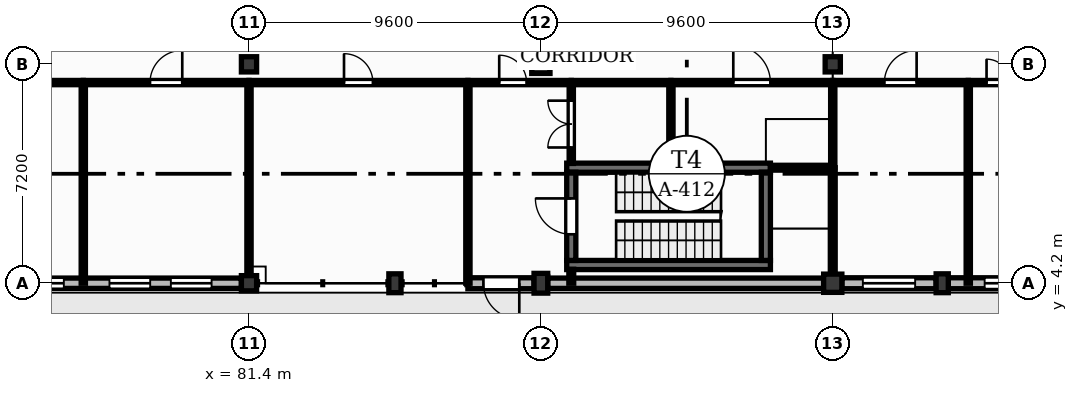
"""IFC4 building model, lengths in metres.
Left out: names, types, materials, properties, quantities, classifications, styles, units other than length and angle.
Written with IfcOpenShell. Run it as: python <this file> out.ifc"""

import sys

from ifc_helpers import new_model, si_unit, direction, frame, frame_2d, origin, origin_2d, place, context, subcontext, project, spatial, rectangle, extrude, element, fill, save


model = new_model("IFC4")
c1 = context("Model", 3, precision=1e-05, world=origin(), true_north=direction((0.0, 1.0)))
c2 = subcontext(c1, "Body", "Model", "MODEL_VIEW")
j1 = project(units=[si_unit("LENGTHUNIT", "METRE"), si_unit("PLANEANGLEUNIT", "RADIAN")], contexts=[c1])
p1 = place(None, origin())
s1 = spatial("IfcSite", under=j1, at=p1, CompositionType="ELEMENT")
p2 = place(p1, origin())
s2 = spatial("IfcBuilding", under=s1, at=p2, CompositionType="ELEMENT")
p3 = place(p2, origin())
s3 = spatial("IfcBuildingStorey", under=s2, at=p3, CompositionType="ELEMENT", Elevation=0.0)
for number, where, z_axis, x_axis in (
    (1, (81.4, 4.2, 0.0), (0.0, 0.0, 1.0), (1.0, 0.0, 0.0)),
    (2, (81.4, 11.4, 0.0), (0.0, 0.0, 1.0), (1.0, 0.0, 0.0)),
):
    element("IfcColumn", number, at=place(p3, frame(where, z_axis=z_axis, x_axis=x_axis)), inside=s3, PredefinedType="COLUMN", context=c2, shape_type="SweptSolid", body=[
        extrude(rectangle(XDim=0.5, YDim=0.5, at=origin_2d()), origin(), (0.0, 0.0, 1.0), 4.2),
    ])
p4 = place(p3, frame((91.0, 4.2, 0.0), z_axis=(0.0, 0.0, 1.0), x_axis=(1.0, 0.0, 0.0)))
e3 = element("IfcColumn", 3, at=p4, inside=s3, PredefinedType="COLUMN", context=c2, shape_type="SweptSolid", body=[
    extrude(rectangle(XDim=0.45, YDim=0.65, at=origin_2d()), origin(), (0.0, 0.0, 1.0), 4.2),
])
for number, where, z_axis, x_axis in (
    (4, (91.0, 11.4, 0.0), (0.0, 0.0, 1.0), (1.0, 0.0, 0.0)),
    (5, (100.6, 4.2, 0.0), (0.0, 0.0, 1.0), (1.0, 0.0, 0.0)),
):
    element("IfcColumn", number, at=place(p3, frame(where, z_axis=z_axis, x_axis=x_axis)), inside=s3, PredefinedType="COLUMN", context=c2, shape_type="SweptSolid", body=[
        extrude(rectangle(XDim=0.6, YDim=0.6, at=origin_2d()), origin(), (0.0, 0.0, 1.0), 4.2),
    ])
p5 = place(p3, frame((100.6, 11.4, 0.0), z_axis=(0.0, 0.0, 1.0), x_axis=(1.0, 0.0, 0.0)))
e6 = element("IfcColumn", 6, at=p5, inside=s3, PredefinedType="COLUMN", context=c2, shape_type="SweptSolid", body=[
    extrude(rectangle(XDim=0.5, YDim=0.5, at=origin_2d()), origin(), (0.0, 0.0, 1.0), 4.2),
])
for number, where, z_axis, x_axis in (
    (7, (86.2, 4.2, 0.0), (0.0, 0.0, 1.0), (1.0, 0.0, 0.0)),
    (8, (104.2, 4.2, 0.0), (0.0, 0.0, 1.0), (1.0, 0.0, 0.0)),
):
    element("IfcColumn", number, at=place(p3, frame(where, z_axis=z_axis, x_axis=x_axis)), inside=s3, PredefinedType="PILASTER", context=c2, shape_type="SweptSolid", body=[
        extrude(rectangle(XDim=0.4, YDim=0.62, at=origin_2d()), origin(), (0.0, 0.0, 1.0), 4.2),
    ])
p6 = place(p3, frame((72.9, 4.2, 0.0), z_axis=(0.0, 0.0, 1.0), x_axis=(1.0, 0.0, 0.0)))
e9 = element("IfcWall", 9, at=p6, inside=s3, PredefinedType="SOLIDWALL", context=c2, shape_type="SweptSolid", body=[
    extrude(rectangle(XDim=8.25, YDim=0.34, at=frame_2d((4.125, 0.0))), origin(), (0.0, 0.0, 1.0), 3.68),
])
p7 = place(p6, frame((0.76, 0.0, 1.35)))
e10 = element("IfcOpeningElement", 10, at=p7, cuts=e9, PredefinedType="OPENING", context=c2, shape_type="SweptSolid", body=[
    extrude(rectangle(XDim=1.65, YDim=1.4, at=frame_2d((0.825, 0.7))), frame((0.0, 0.18, 0.0), z_axis=(0.0, -1.0, 0.0), x_axis=(1.0, 0.0, 0.0)), (0.0, 0.0, 1.0), 0.36),
])
p8 = place(p6, frame((3.91, 0.0, 1.0)))
e11 = element("IfcOpeningElement", 11, at=p8, cuts=e9, PredefinedType="OPENING", context=c2, shape_type="SweptSolid", body=[
    extrude(rectangle(XDim=1.34, YDim=1.95, at=frame_2d((0.67, 0.975))), frame((0.0, 0.18, 0.0), z_axis=(0.0, -1.0, 0.0), x_axis=(1.0, 0.0, 0.0)), (0.0, 0.0, 1.0), 0.36),
])
p9 = place(p6, frame((5.93, 0.0, 1.0)))
e12 = element("IfcOpeningElement", 12, at=p9, cuts=e9, PredefinedType="OPENING", context=c2, shape_type="SweptSolid", body=[
    extrude(rectangle(XDim=1.34, YDim=1.95, at=frame_2d((0.67, 0.975))), frame((0.0, 0.18, 0.0), z_axis=(0.0, -1.0, 0.0), x_axis=(1.0, 0.0, 0.0)), (0.0, 0.0, 1.0), 0.36),
])
p10 = place(p3, frame((88.6, 4.2, 0.0), z_axis=(0.0, 0.0, 1.0), x_axis=(1.0, 0.0, 0.0)))
e13 = element("IfcWall", 13, at=p10, inside=s3, PredefinedType="SOLIDWALL", context=c2, shape_type="SweptSolid", body=[
    extrude(rectangle(XDim=2.175, YDim=0.36, at=frame_2d((1.087, 0.0))), origin(), (0.0, 0.0, 1.0), 3.68),
])
p11 = place(p10, frame((0.51, 0.0, 0.0)))
e14 = element("IfcOpeningElement", 14, at=p11, cuts=e13, PredefinedType="OPENING", context=c2, shape_type="SweptSolid", body=[
    extrude(rectangle(XDim=1.18, YDim=2.2, at=frame_2d((0.59, 1.1))), frame((0.0, 0.19, 0.0), z_axis=(0.0, -1.0, 0.0), x_axis=(1.0, 0.0, 0.0)), (0.0, 0.0, 1.0), 0.38),
])
p12 = place(p3, frame((91.225, 4.2, 0.0), z_axis=(0.0, 0.0, 1.0), x_axis=(1.0, 0.0, 0.0)))
e15 = element("IfcWall", 15, at=p12, inside=s3, PredefinedType="SOLIDWALL", context=c2, shape_type="SweptSolid", body=[
    extrude(rectangle(XDim=9.075, YDim=0.34, at=frame_2d((4.538, 0.0))), origin(), (0.0, 0.0, 1.0), 3.68),
])
p13 = place(p3, frame((100.9, 4.2, 0.0), z_axis=(0.0, 0.0, 1.0), x_axis=(1.0, 0.0, 0.0)))
e16 = element("IfcWall", 16, at=p13, inside=s3, PredefinedType="SOLIDWALL", context=c2, shape_type="SweptSolid", body=[
    extrude(rectangle(XDim=3.1, YDim=0.36, at=frame_2d((1.55, 0.0))), origin(), (0.0, 0.0, 1.0), 3.68),
])
p14 = place(p13, frame((0.69, 0.0, 1.0)))
e17 = element("IfcOpeningElement", 17, at=p14, cuts=e16, PredefinedType="OPENING", context=c2, shape_type="SweptSolid", body=[
    extrude(rectangle(XDim=1.72, YDim=2.2, at=frame_2d((0.86, 1.1))), frame((0.0, 0.19, 0.0), z_axis=(0.0, -1.0, 0.0), x_axis=(1.0, 0.0, 0.0)), (0.0, 0.0, 1.0), 0.38),
])
p15 = place(p3, frame((104.4, 4.2, 0.0), z_axis=(0.0, 0.0, 1.0), x_axis=(1.0, 0.0, 0.0)))
e18 = element("IfcWall", 18, at=p15, inside=s3, PredefinedType="SOLIDWALL", context=c2, shape_type="SweptSolid", body=[
    extrude(rectangle(XDim=3.175, YDim=0.36, at=frame_2d((1.587, 0.0))), origin(), (0.0, 0.0, 1.0), 3.68),
])
p16 = place(p15, frame((1.196, 0.0, 1.5)))
e19 = element("IfcOpeningElement", 19, at=p16, cuts=e18, PredefinedType="OPENING", context=c2, shape_type="SweptSolid", body=[
    extrude(rectangle(XDim=1.32, YDim=1.25, at=frame_2d((0.66, 0.625))), frame((0.0, 0.19, 0.0), z_axis=(0.0, -1.0, 0.0), x_axis=(1.0, 0.0, 0.0)), (0.0, 0.0, 1.0), 0.38),
])
for number, where, z_axis, x_axis in (
    (20, (91.85, 4.8, 0.0), (0.0, 0.0, 1.0), (1.0, 0.0, 0.0)),
    (21, (91.85, 8.0, 0.0), (0.0, 0.0, 1.0), (1.0, 0.0, 0.0)),
):
    element("IfcWall", number, at=place(p3, frame(where, z_axis=z_axis, x_axis=x_axis)), inside=s3, PredefinedType="SHEAR", context=c2, shape_type="SweptSolid", body=[
        extrude(rectangle(XDim=6.7, YDim=0.3, at=frame_2d((3.35, 0.0))), origin(), (0.0, 0.0, 1.0), 4.25),
    ])
p17 = place(p3, frame((92.0, 4.95, 0.0), z_axis=(0.0, 0.0, 1.0), x_axis=(0.0, 1.0, 0.0)))
e22 = element("IfcWall", 22, at=p17, inside=s3, PredefinedType="SHEAR", context=c2, shape_type="SweptSolid", body=[
    extrude(rectangle(XDim=2.9, YDim=0.3, at=frame_2d((1.45, 0.0))), origin(), (0.0, 0.0, 1.0), 4.25),
])
p18 = place(p17, frame((0.86, 0.0, 0.0)))
e23 = element("IfcOpeningElement", 23, at=p18, cuts=e22, PredefinedType="OPENING", context=c2, shape_type="SweptSolid", body=[
    extrude(rectangle(XDim=1.18, YDim=2.15, at=frame_2d((0.59, 1.075))), frame((0.0, 0.16, 0.0), z_axis=(0.0, -1.0, 0.0), x_axis=(1.0, 0.0, 0.0)), (0.0, 0.0, 1.0), 0.32),
])
p19 = place(p3, frame((98.4, 4.95, 0.0), z_axis=(0.0, 0.0, 1.0), x_axis=(0.0, 1.0, 0.0)))
e24 = element("IfcWall", 24, at=p19, inside=s3, PredefinedType="SHEAR", context=c2, shape_type="SweptSolid", body=[
    extrude(rectangle(XDim=2.9, YDim=0.3, at=frame_2d((1.45, 0.0))), origin(), (0.0, 0.0, 1.0), 4.25),
])
p20 = place(p3, frame((71.805, 10.8, 0.0), z_axis=(0.0, 0.0, 1.0), x_axis=(1.0, 0.0, 0.0)))
e25 = element("IfcWall", 25, at=p20, inside=s3, PredefinedType="PARTITIONING", context=c2, shape_type="SweptSolid", body=[
    extrude(rectangle(XDim=4.145, YDim=0.14, at=frame_2d((2.073, 0.0))), origin(), (0.0, 0.0, 1.0), 4.18),
])
p21 = place(p20, frame((1.583, 0.0, 0.0)))
e26 = element("IfcOpeningElement", 26, at=p21, cuts=e25, PredefinedType="OPENING", context=c2, shape_type="SweptSolid", body=[
    extrude(rectangle(XDim=0.98, YDim=2.15, at=frame_2d((0.49, 1.075))), frame((0.0, 0.08, 0.0), z_axis=(0.0, -1.0, 0.0), x_axis=(1.0, 0.0, 0.0)), (0.0, 0.0, 1.0), 0.16),
])
p22 = place(p3, frame((75.95, 4.2, 0.0), z_axis=(0.0, 0.0, 1.0), x_axis=(0.0, 1.0, 0.0)))
e27 = element("IfcWall", 27, at=p22, inside=s3, PredefinedType="PARTITIONING", context=c2, shape_type="SweptSolid", body=[
    extrude(rectangle(XDim=6.53, YDim=0.14, at=frame_2d((3.265, 0.0))), origin(), (0.0, 0.0, 1.0), 4.18),
])
p23 = place(p3, frame((75.95, 10.8, 0.0), z_axis=(0.0, 0.0, 1.0), x_axis=(1.0, 0.0, 0.0)))
e28 = element("IfcWall", 28, at=p23, inside=s3, PredefinedType="PARTITIONING", context=c2, shape_type="SweptSolid", body=[
    extrude(rectangle(XDim=5.45, YDim=0.14, at=frame_2d((2.725, 0.0))), origin(), (0.0, 0.0, 1.0), 4.18),
])
p24 = place(p23, frame((2.195, 0.0, 0.0)))
e29 = element("IfcOpeningElement", 29, at=p24, cuts=e28, PredefinedType="OPENING", context=c2, shape_type="SweptSolid", body=[
    extrude(rectangle(XDim=1.06, YDim=2.15, at=frame_2d((0.53, 1.075))), frame((0.0, 0.08, 0.0), z_axis=(0.0, -1.0, 0.0), x_axis=(1.0, 0.0, 0.0)), (0.0, 0.0, 1.0), 0.16),
])
p25 = place(p3, frame((81.4, 4.45, 0.0), z_axis=(0.0, 0.0, 1.0), x_axis=(0.0, 1.0, 0.0)))
e30 = element("IfcWall", 30, at=p25, inside=s3, PredefinedType="PARTITIONING", context=c2, shape_type="SweptSolid", body=[
    extrude(rectangle(XDim=6.28, YDim=0.14, at=frame_2d((3.14, 0.0))), origin(), (0.0, 0.0, 1.0), 3.5),
])
p26 = place(p3, frame((81.4, 10.8, 0.0), z_axis=(0.0, 0.0, 1.0), x_axis=(1.0, 0.0, 0.0)))
e31 = element("IfcWall", 31, at=p26, inside=s3, PredefinedType="PARTITIONING", context=c2, shape_type="SweptSolid", body=[
    extrude(rectangle(XDim=7.2, YDim=0.14, at=frame_2d((3.6, 0.0))), origin(), (0.0, 0.0, 1.0), 4.18),
])
p27 = place(p26, frame((3.125, 0.0, 0.0)))
e32 = element("IfcOpeningElement", 32, at=p27, cuts=e31, PredefinedType="OPENING", context=c2, shape_type="SweptSolid", body=[
    extrude(rectangle(XDim=0.95, YDim=2.1, at=frame_2d((0.475, 1.05))), frame((0.0, 0.08, 0.0), z_axis=(0.0, -1.0, 0.0), x_axis=(1.0, 0.0, 0.0)), (0.0, 0.0, 1.0), 0.16),
])
p28 = place(p3, frame((88.6, 4.2, 0.0), z_axis=(0.0, 0.0, 1.0), x_axis=(0.0, 1.0, 0.0)))
e33 = element("IfcWall", 33, at=p28, inside=s3, PredefinedType="PARTITIONING", context=c2, shape_type="SweptSolid", body=[
    extrude(rectangle(XDim=6.53, YDim=0.14, at=frame_2d((3.265, 0.0))), origin(), (0.0, 0.0, 1.0), 3.9),
])
p29 = place(p3, frame((88.6, 10.8, 0.0), z_axis=(0.0, 0.0, 1.0), x_axis=(1.0, 0.0, 0.0)))
e34 = element("IfcWall", 34, at=p29, inside=s3, PredefinedType="PARTITIONING", context=c2, shape_type="SweptSolid", body=[
    extrude(rectangle(XDim=3.4, YDim=0.14, at=frame_2d((1.7, 0.0))), origin(), (0.0, 0.0, 1.0), 4.18),
])
p30 = place(p29, frame((1.03, 0.0, 0.0)))
e35 = element("IfcOpeningElement", 35, at=p30, cuts=e34, PredefinedType="OPENING", context=c2, shape_type="SweptSolid", body=[
    extrude(rectangle(XDim=0.9, YDim=2.1, at=frame_2d((0.45, 1.05))), frame((0.0, 0.08, 0.0), z_axis=(0.0, -1.0, 0.0), x_axis=(1.0, 0.0, 0.0)), (0.0, 0.0, 1.0), 0.16),
])
p31 = place(p3, frame((92.0, 8.14, 0.0), z_axis=(0.0, 0.0, 1.0), x_axis=(0.0, 1.0, 0.0)))
e36 = element("IfcWall", 36, at=p31, inside=s3, PredefinedType="PARTITIONING", context=c2, shape_type="SweptSolid", body=[
    extrude(rectangle(XDim=2.59, YDim=0.14, at=frame_2d((1.295, 0.0))), origin(), (0.0, 0.0, 1.0), 4.18),
])
p32 = place(p31, frame((0.525, 0.0, 0.0)))
e37 = element("IfcOpeningElement", 37, at=p32, cuts=e36, PredefinedType="OPENING", context=c2, shape_type="SweptSolid", body=[
    extrude(rectangle(XDim=1.54, YDim=2.25, at=frame_2d((0.77, 1.125))), frame((0.0, 0.08, 0.0), z_axis=(0.0, -1.0, 0.0), x_axis=(1.0, 0.0, 0.0)), (0.0, 0.0, 1.0), 0.16),
])
p33 = place(p3, frame((92.0, 10.8, 0.0), z_axis=(0.0, 0.0, 1.0), x_axis=(1.0, 0.0, 0.0)))
e38 = element("IfcWall", 38, at=p33, inside=s3, PredefinedType="PARTITIONING", context=c2, shape_type="SweptSolid", body=[
    extrude(rectangle(XDim=3.277, YDim=0.14, at=frame_2d((1.639, 0.0))), origin(), (0.0, 0.0, 1.0), 4.18),
])
p34 = place(p3, frame((95.277, 8.14, 0.0), z_axis=(0.0, 0.0, 1.0), x_axis=(0.0, 1.0, 0.0)))
e39 = element("IfcWall", 39, at=p34, inside=s3, PredefinedType="PARTITIONING", context=c2, shape_type="SweptSolid", body=[
    extrude(rectangle(XDim=2.59, YDim=0.14, at=frame_2d((1.295, 0.0))), origin(), (0.0, 0.0, 1.0), 4.18),
])
p35 = place(p3, frame((95.277, 10.8, 0.0), z_axis=(0.0, 0.0, 1.0), x_axis=(1.0, 0.0, 0.0)))
e40 = element("IfcWall", 40, at=p35, inside=s3, PredefinedType="PARTITIONING", context=c2, shape_type="SweptSolid", body=[
    extrude(rectangle(XDim=5.323, YDim=0.14, at=frame_2d((2.662, 0.0))), origin(), (0.0, 0.0, 1.0), 4.18),
])
p36 = place(p35, frame((2.052, 0.0, 0.0)))
e41 = element("IfcOpeningElement", 41, at=p36, cuts=e40, PredefinedType="OPENING", context=c2, shape_type="SweptSolid", body=[
    extrude(rectangle(XDim=1.22, YDim=2.1, at=frame_2d((0.61, 1.05))), frame((0.0, 0.08, 0.0), z_axis=(0.0, -1.0, 0.0), x_axis=(1.0, 0.0, 0.0)), (0.0, 0.0, 1.0), 0.16),
])
p37 = place(p3, frame((100.6, 8.0, 0.0), z_axis=(0.0, 0.0, 1.0), x_axis=(0.0, 1.0, 0.0)))
e42 = element("IfcWall", 42, at=p37, inside=s3, PredefinedType="PARTITIONING", context=c2, shape_type="SweptSolid", body=[
    extrude(rectangle(XDim=2.73, YDim=0.14, at=frame_2d((1.365, 0.0))), origin(), (0.0, 0.0, 1.0), 3.5),
])
p38 = place(p3, frame((100.6, 10.8, 0.0), z_axis=(0.0, 0.0, 1.0), x_axis=(1.0, 0.0, 0.0)))
e43 = element("IfcWall", 43, at=p38, inside=s3, PredefinedType="PARTITIONING", context=c2, shape_type="SweptSolid", body=[
    extrude(rectangle(XDim=4.457, YDim=0.14, at=frame_2d((2.229, 0.0))), origin(), (0.0, 0.0, 1.0), 4.18),
])
p39 = place(p38, frame((1.698, 0.0, 0.0)))
e44 = element("IfcOpeningElement", 44, at=p39, cuts=e43, PredefinedType="OPENING", context=c2, shape_type="SweptSolid", body=[
    extrude(rectangle(XDim=1.06, YDim=2.15, at=frame_2d((0.53, 1.075))), frame((0.0, 0.08, 0.0), z_axis=(0.0, -1.0, 0.0), x_axis=(1.0, 0.0, 0.0)), (0.0, 0.0, 1.0), 0.16),
])
p40 = place(p3, frame((105.057, 4.2, 0.0), z_axis=(0.0, 0.0, 1.0), x_axis=(0.0, 1.0, 0.0)))
e45 = element("IfcWall", 45, at=p40, inside=s3, PredefinedType="PARTITIONING", context=c2, shape_type="SweptSolid", body=[
    extrude(rectangle(XDim=6.53, YDim=0.14, at=frame_2d((3.265, 0.0))), origin(), (0.0, 0.0, 1.0), 4.18),
])
p41 = place(p3, frame((105.057, 10.8, 0.0), z_axis=(0.0, 0.0, 1.0), x_axis=(1.0, 0.0, 0.0)))
e46 = element("IfcWall", 46, at=p41, inside=s3, PredefinedType="PARTITIONING", context=c2, shape_type="SweptSolid", body=[
    extrude(rectangle(XDim=2.743, YDim=0.14, at=frame_2d((1.372, 0.0))), origin(), (0.0, 0.0, 1.0), 4.18),
])
p42 = place(p41, frame((0.602, 0.0, 0.0)))
e47 = element("IfcOpeningElement", 47, at=p42, cuts=e46, PredefinedType="OPENING", context=c2, shape_type="SweptSolid", body=[
    extrude(rectangle(XDim=1.54, YDim=2.25, at=frame_2d((0.77, 1.125))), frame((0.0, 0.08, 0.0), z_axis=(0.0, -1.0, 0.0), x_axis=(1.0, 0.0, 0.0)), (0.0, 0.0, 1.0), 0.16),
])
p43 = place(p3, frame((92.0, 4.2, 0.0), z_axis=(0.0, 0.0, 1.0), x_axis=(0.0, 1.0, 0.0)))
e48 = element("IfcWall", 48, at=p43, inside=s3, PredefinedType="PARTITIONING", context=c2, shape_type="SweptSolid", body=[
    extrude(rectangle(XDim=0.46, YDim=0.16, at=frame_2d((0.23, 0.0))), origin(), (0.0, 0.0, 1.0), 4.18),
])
p44 = place(p3, frame((98.55, 8.0, 0.0), z_axis=(0.0, 0.0, 1.0), x_axis=(1.0, 0.0, 0.0)))
e49 = element("IfcWall", 49, at=p44, inside=s3, PredefinedType="PARTITIONING", context=c2, shape_type="SweptSolid", body=[
    extrude(rectangle(XDim=2.05, YDim=0.16, at=frame_2d((1.025, 0.0))), origin(), (0.0, 0.0, 1.0), 4.18),
])
p45 = place(p3, frame((100.6, 4.5, 0.0), z_axis=(0.0, 0.0, 1.0), x_axis=(0.0, 1.0, 0.0)))
e50 = element("IfcWall", 50, at=p45, inside=s3, PredefinedType="PARTITIONING", context=c2, shape_type="SweptSolid", body=[
    extrude(rectangle(XDim=3.5, YDim=0.16, at=frame_2d((1.75, 0.0))), origin(), (0.0, 0.0, 1.0), 3.5),
])
p46 = place(p7, origin())
e51 = element("IfcWindow", 51, at=p46, inside=s3, PartitioningType="DOUBLE_PANEL_VERTICAL", PredefinedType="WINDOW", context=c2, shape_type="SweptSolid", body=[
    extrude(rectangle(XDim=1.65, YDim=1.4, at=frame_2d((0.825, 0.7))), frame((0.0, 0.03, 0.0), z_axis=(0.0, -1.0, 0.0), x_axis=(1.0, 0.0, 0.0)), (0.0, 0.0, 1.0), 0.06),
])
fill(e10, e51)
p47 = place(p8, origin())
e52 = element("IfcWindow", 52, at=p47, inside=s3, PartitioningType="SINGLE_PANEL", PredefinedType="WINDOW", context=c2, shape_type="SweptSolid", body=[
    extrude(rectangle(XDim=1.34, YDim=1.95, at=frame_2d((0.67, 0.975))), frame((0.0, 0.03, 0.0), z_axis=(0.0, -1.0, 0.0), x_axis=(1.0, 0.0, 0.0)), (0.0, 0.0, 1.0), 0.06),
])
fill(e11, e52)
p48 = place(p9, origin())
e53 = element("IfcWindow", 53, at=p48, inside=s3, PartitioningType="SINGLE_PANEL", PredefinedType="WINDOW", context=c2, shape_type="SweptSolid", body=[
    extrude(rectangle(XDim=1.34, YDim=1.95, at=frame_2d((0.67, 0.975))), frame((0.0, 0.03, 0.0), z_axis=(0.0, -1.0, 0.0), x_axis=(1.0, 0.0, 0.0)), (0.0, 0.0, 1.0), 0.06),
])
fill(e12, e53)
p49 = place(p11, frame((1.18, 0.0, 0.0), z_axis=(0.0, 0.0, 1.0), x_axis=(-1.0, 0.0, 0.0)))
e54 = element("IfcDoor", 54, at=p49, inside=s3, OperationType="SINGLE_SWING_LEFT", PredefinedType="DOOR", context=c2, shape_type="SweptSolid", body=[
    extrude(rectangle(XDim=1.18, YDim=2.2, at=frame_2d((0.59, 1.1))), frame((0.0, 0.025, 0.0), z_axis=(0.0, -1.0, 0.0), x_axis=(1.0, 0.0, 0.0)), (0.0, 0.0, 1.0), 0.05),
])
fill(e14, e54)
p50 = place(p14, origin())
e55 = element("IfcWindow", 55, at=p50, inside=s3, PartitioningType="DOUBLE_PANEL_VERTICAL", PredefinedType="WINDOW", context=c2, shape_type="SweptSolid", body=[
    extrude(rectangle(XDim=1.72, YDim=2.2, at=frame_2d((0.86, 1.1))), frame((0.0, 0.03, 0.0), z_axis=(0.0, -1.0, 0.0), x_axis=(1.0, 0.0, 0.0)), (0.0, 0.0, 1.0), 0.06),
])
fill(e17, e55)
p51 = place(p16, origin())
e56 = element("IfcWindow", 56, at=p51, inside=s3, PartitioningType="SINGLE_PANEL", PredefinedType="WINDOW", context=c2, shape_type="SweptSolid", body=[
    extrude(rectangle(XDim=1.32, YDim=1.25, at=frame_2d((0.66, 0.625))), frame((0.0, 0.03, 0.0), z_axis=(0.0, -1.0, 0.0), x_axis=(1.0, 0.0, 0.0)), (0.0, 0.0, 1.0), 0.06),
])
fill(e19, e56)
p52 = place(p18, origin())
e57 = element("IfcDoor", 57, at=p52, inside=s3, OperationType="SINGLE_SWING_RIGHT", PredefinedType="DOOR", context=c2, shape_type="SweptSolid", body=[
    extrude(rectangle(XDim=1.18, YDim=2.15, at=frame_2d((0.59, 1.075))), frame((0.0, 0.025, 0.0), z_axis=(0.0, -1.0, 0.0), x_axis=(1.0, 0.0, 0.0)), (0.0, 0.0, 1.0), 0.05),
])
fill(e23, e57)
p53 = place(p30, origin())
e58 = element("IfcDoor", 58, at=p53, inside=s3, OperationType="SINGLE_SWING_LEFT", PredefinedType="DOOR", context=c2, shape_type="SweptSolid", body=[
    extrude(rectangle(XDim=0.9, YDim=2.1, at=frame_2d((0.45, 1.05))), frame((0.0, 0.025, 0.0), z_axis=(0.0, -1.0, 0.0), x_axis=(1.0, 0.0, 0.0)), (0.0, 0.0, 1.0), 0.05),
])
fill(e35, e58)
p54 = place(p24, origin())
e59 = element("IfcDoor", 59, at=p54, inside=s3, OperationType="SINGLE_SWING_RIGHT", PredefinedType="DOOR", context=c2, shape_type="SweptSolid", body=[
    extrude(rectangle(XDim=1.06, YDim=2.15, at=frame_2d((0.53, 1.075))), frame((0.0, 0.025, 0.0), z_axis=(0.0, -1.0, 0.0), x_axis=(1.0, 0.0, 0.0)), (0.0, 0.0, 1.0), 0.05),
])
fill(e29, e59)
p55 = place(p27, origin())
e60 = element("IfcDoor", 60, at=p55, inside=s3, OperationType="SINGLE_SWING_LEFT", PredefinedType="DOOR", context=c2, shape_type="SweptSolid", body=[
    extrude(rectangle(XDim=0.95, YDim=2.1, at=frame_2d((0.475, 1.05))), frame((0.0, 0.025, 0.0), z_axis=(0.0, -1.0, 0.0), x_axis=(1.0, 0.0, 0.0)), (0.0, 0.0, 1.0), 0.05),
])
fill(e32, e60)
p56 = place(p32, origin())
e61 = element("IfcDoor", 61, at=p56, inside=s3, OperationType="DOUBLE_DOOR_SINGLE_SWING", PredefinedType="DOOR", context=c2, shape_type="SweptSolid", body=[
    extrude(rectangle(XDim=1.54, YDim=2.25, at=frame_2d((0.77, 1.125))), frame((0.0, 0.025, 0.0), z_axis=(0.0, -1.0, 0.0), x_axis=(1.0, 0.0, 0.0)), (0.0, 0.0, 1.0), 0.05),
])
fill(e37, e61)
p57 = place(p36, origin())
e62 = element("IfcDoor", 62, at=p57, inside=s3, OperationType="SINGLE_SWING_LEFT", PredefinedType="DOOR", context=c2, shape_type="SweptSolid", body=[
    extrude(rectangle(XDim=1.22, YDim=2.1, at=frame_2d((0.61, 1.05))), frame((0.0, 0.025, 0.0), z_axis=(0.0, -1.0, 0.0), x_axis=(1.0, 0.0, 0.0)), (0.0, 0.0, 1.0), 0.05),
])
fill(e41, e62)
p58 = place(p39, origin())
e63 = element("IfcDoor", 63, at=p58, inside=s3, OperationType="SINGLE_SWING_RIGHT", PredefinedType="DOOR", context=c2, shape_type="SweptSolid", body=[
    extrude(rectangle(XDim=1.06, YDim=2.15, at=frame_2d((0.53, 1.075))), frame((0.0, 0.025, 0.0), z_axis=(0.0, -1.0, 0.0), x_axis=(1.0, 0.0, 0.0)), (0.0, 0.0, 1.0), 0.05),
])
fill(e44, e63)
p59 = place(p42, origin())
e64 = element("IfcDoor", 64, at=p59, inside=s3, OperationType="DOUBLE_DOOR_SINGLE_SWING", PredefinedType="DOOR", context=c2, shape_type="SweptSolid", body=[
    extrude(rectangle(XDim=1.54, YDim=2.25, at=frame_2d((0.77, 1.125))), frame((0.0, 0.025, 0.0), z_axis=(0.0, -1.0, 0.0), x_axis=(1.0, 0.0, 0.0)), (0.0, 0.0, 1.0), 0.05),
])
fill(e47, e64)
save(model, sys.argv[1])
